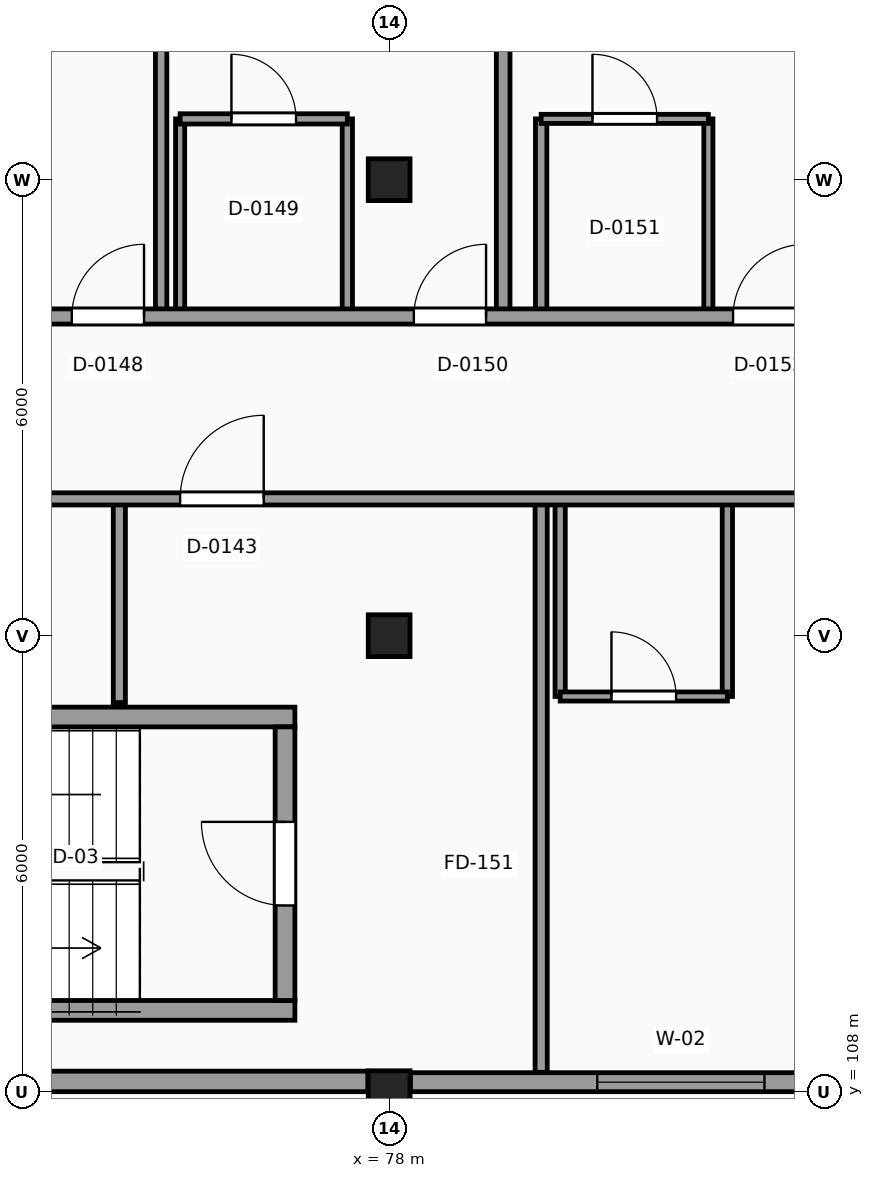
"""IFC4 building model, lengths in metres.
Left out: names, types, materials, properties, quantities, classifications, styles, units other than length and angle.
Written with IfcOpenShell. Run it as: python <this file> out.ifc"""

import sys

from ifc_helpers import new_model, si_unit, direction, frame, frame_2d, origin, origin_2d, place, context, subcontext, project, spatial, rectangle, extrude, element, fill, save


model = new_model("IFC4")
c1 = context("Model", 3, precision=1e-05, world=origin(), true_north=direction((0.0, 1.0)))
c2 = subcontext(c1, "Body", "Model", "MODEL_VIEW")
j1 = project(units=[si_unit("LENGTHUNIT", "METRE"), si_unit("PLANEANGLEUNIT", "RADIAN")], contexts=[c1])
p1 = place(None, origin())
s1 = spatial("IfcSite", under=j1, at=p1, CompositionType="ELEMENT")
p2 = place(p1, origin())
s2 = spatial("IfcBuilding", under=s1, at=p2, CompositionType="ELEMENT")
p3 = place(p2, frame((0.0, 0.0, 24.6)))
s3 = spatial("IfcBuildingStorey", under=s2, at=p3, CompositionType="ELEMENT", Elevation=24.6)
for number, where, z_axis, x_axis in (
    (1, (78.0, 108.0, 0.0), (0.0, 0.0, 1.0), (1.0, 0.0, 0.0)),
    (2, (78.0, 114.0, 0.0), (0.0, 0.0, 1.0), (1.0, 0.0, 0.0)),
    (3, (78.0, 120.0, 0.0), (0.0, 0.0, 1.0), (1.0, 0.0, 0.0)),
):
    element("IfcColumn", number, at=place(p3, frame(where, z_axis=z_axis, x_axis=x_axis)), inside=s3, PredefinedType="COLUMN", context=c2, shape_type="SweptSolid", body=[
        extrude(rectangle(XDim=0.55, YDim=0.55, at=origin_2d()), origin(), (0.0, 0.0, 1.0), 3.6),
    ])
p4 = place(p3, frame((72.305, 108.135, 0.0), z_axis=(0.0, 0.0, 1.0), x_axis=(1.0, 0.0, 0.0)))
e4 = element("IfcWall", 4, at=p4, inside=s3, PredefinedType="SOLIDWALL", context=c2, shape_type="SweptSolid", body=[
    extrude(rectangle(XDim=5.415, YDim=0.27, at=frame_2d((2.708, 0.0))), origin(), (0.0, 0.0, 1.0), 2.73),
])
p5 = place(p3, frame((78.28, 108.125, 0.0), z_axis=(0.0, 0.0, 1.0), x_axis=(1.0, 0.0, 0.0)))
e5 = element("IfcWall", 5, at=p5, inside=s3, PredefinedType="SOLIDWALL", context=c2, shape_type="SweptSolid", body=[
    extrude(rectangle(XDim=5.415, YDim=0.25, at=frame_2d((2.708, 0.0))), origin(), (0.0, 0.0, 1.0), 2.73),
])
p6 = place(p5, frame((2.458, 0.0, 0.8)))
e6 = element("IfcOpeningElement", 6, at=p6, cuts=e5, PredefinedType="OPENING", context=c2, shape_type="SweptSolid", body=[
    extrude(rectangle(XDim=2.2, YDim=1.75, at=frame_2d((1.1, 0.875))), frame((0.0, 0.135, 0.0), z_axis=(0.0, -1.0, 0.0), x_axis=(1.0, 0.0, 0.0)), (0.0, 0.0, 1.0), 0.27),
])
for number, where, z_axis, x_axis in (
    (7, (66.04, 109.07, 0.0), (0.0, 0.0, 1.0), (1.0, 0.0, 0.0)),
    (8, (66.04, 112.93, 0.0), (0.0, 0.0, 1.0), (1.0, 0.0, 0.0)),
):
    element("IfcWall", number, at=place(p3, frame(where, z_axis=z_axis, x_axis=x_axis)), inside=s3, PredefinedType="SHEAR", context=c2, shape_type="SweptSolid", body=[
        extrude(rectangle(XDim=10.72, YDim=0.26, at=frame_2d((5.36, 0.0))), origin(), (0.0, 0.0, 1.0), 3.6),
    ])
p7 = place(p3, frame((76.63, 109.2, 0.0), z_axis=(0.0, 0.0, 1.0), x_axis=(0.0, 1.0, 0.0)))
e9 = element("IfcWall", 9, at=p7, inside=s3, PredefinedType="SHEAR", context=c2, shape_type="SweptSolid", body=[
    extrude(rectangle(XDim=3.6, YDim=0.26, at=frame_2d((1.8, 0.0))), origin(), (0.0, 0.0, 1.0), 3.6),
])
p8 = place(p7, frame((1.25, 0.0, 0.0)))
e10 = element("IfcOpeningElement", 10, at=p8, cuts=e9, PredefinedType="OPENING", context=c2, shape_type="SweptSolid", body=[
    extrude(rectangle(XDim=1.1, YDim=2.15, at=frame_2d((0.55, 1.075))), frame((0.0, 0.14, 0.0), z_axis=(0.0, -1.0, 0.0), x_axis=(1.0, 0.0, 0.0)), (0.0, 0.0, 1.0), 0.28),
])
p9 = place(p3, frame((74.45, 113.12, 0.0), z_axis=(0.0, 0.0, 1.0), x_axis=(0.0, 1.0, 0.0)))
e11 = element("IfcWall", 11, at=p9, inside=s3, PredefinedType="PARTITIONING", context=c2, shape_type="SweptSolid", body=[
    extrude(rectangle(XDim=2.68, YDim=0.16, at=frame_2d((1.34, 0.0))), origin(), (0.0, 0.0, 1.0), 3.38),
])
p10 = place(p3, frame((75.0, 118.2, 0.0), z_axis=(0.0, 0.0, 1.0), x_axis=(0.0, 1.0, 0.0)))
e12 = element("IfcWall", 12, at=p10, inside=s3, PredefinedType="PARTITIONING", context=c2, shape_type="SweptSolid", body=[
    extrude(rectangle(XDim=7.565, YDim=0.15, at=frame_2d((3.782, 0.0))), origin(), (0.0, 0.0, 1.0), 3.38),
])
p11 = place(p3, frame((75.25, 118.2, 0.0), z_axis=(0.0, 0.0, 1.0), x_axis=(0.0, 1.0, 0.0)))
e13 = element("IfcWall", 13, at=p11, inside=s3, PredefinedType="PARTITIONING", context=c2, shape_type="SweptSolid", body=[
    extrude(rectangle(XDim=2.6, YDim=0.12, at=frame_2d((1.3, 0.0))), origin(), (0.0, 0.0, 1.0), 3.38),
])
p12 = place(p3, frame((77.45, 118.2, 0.0), z_axis=(0.0, 0.0, 1.0), x_axis=(0.0, 1.0, 0.0)))
e14 = element("IfcWall", 14, at=p12, inside=s3, PredefinedType="PARTITIONING", context=c2, shape_type="SweptSolid", body=[
    extrude(rectangle(XDim=2.6, YDim=0.135, at=frame_2d((1.3, 0.0))), origin(), (0.0, 0.0, 1.0), 3.38),
])
p13 = place(p3, frame((79.5, 118.2, 0.0), z_axis=(0.0, 0.0, 1.0), x_axis=(0.0, 1.0, 0.0)))
e15 = element("IfcWall", 15, at=p13, inside=s3, PredefinedType="PARTITIONING", context=c2, shape_type="SweptSolid", body=[
    extrude(rectangle(XDim=7.545, YDim=0.18, at=frame_2d((3.772, 0.0))), origin(), (0.0, 0.0, 1.0), 3.38),
])
p14 = place(p3, frame((80.0, 108.255, 0.0), z_axis=(0.0, 0.0, 1.0), x_axis=(0.0, 1.0, 0.0)))
e16 = element("IfcWall", 16, at=p14, inside=s3, PredefinedType="PARTITIONING", context=c2, shape_type="SweptSolid", body=[
    extrude(rectangle(XDim=7.545, YDim=0.16, at=frame_2d((3.772, 0.0))), origin(), (0.0, 0.0, 1.0), 3.38),
])
p15 = place(p3, frame((80.0, 118.2, 0.0), z_axis=(0.0, 0.0, 1.0), x_axis=(0.0, 1.0, 0.0)))
e17 = element("IfcWall", 17, at=p15, inside=s3, PredefinedType="PARTITIONING", context=c2, shape_type="SweptSolid", body=[
    extrude(rectangle(XDim=2.6, YDim=0.15, at=frame_2d((1.3, 0.0))), origin(), (0.0, 0.0, 1.0), 3.38),
])
p16 = place(p3, frame((80.25, 113.2, 0.0), z_axis=(0.0, 0.0, 1.0), x_axis=(0.0, 1.0, 0.0)))
e18 = element("IfcWall", 18, at=p16, inside=s3, PredefinedType="PARTITIONING", context=c2, shape_type="SweptSolid", body=[
    extrude(rectangle(XDim=2.6, YDim=0.135, at=frame_2d((1.3, 0.0))), origin(), (0.0, 0.0, 1.0), 3.38),
])
p17 = place(p3, frame((82.2, 118.2, 0.0), z_axis=(0.0, 0.0, 1.0), x_axis=(0.0, 1.0, 0.0)))
e19 = element("IfcWall", 19, at=p17, inside=s3, PredefinedType="PARTITIONING", context=c2, shape_type="SweptSolid", body=[
    extrude(rectangle(XDim=2.6, YDim=0.12, at=frame_2d((1.3, 0.0))), origin(), (0.0, 0.0, 1.0), 3.38),
])
p18 = place(p3, frame((82.45, 113.2, 0.0), z_axis=(0.0, 0.0, 1.0), x_axis=(0.0, 1.0, 0.0)))
e20 = element("IfcWall", 20, at=p18, inside=s3, PredefinedType="PARTITIONING", context=c2, shape_type="SweptSolid", body=[
    extrude(rectangle(XDim=2.6, YDim=0.135, at=frame_2d((1.3, 0.0))), origin(), (0.0, 0.0, 1.0), 3.38),
])
p19 = place(p3, frame((80.25, 113.2, 0.0), z_axis=(0.0, 0.0, 1.0), x_axis=(1.0, 0.0, 0.0)))
e21 = element("IfcWall", 21, at=p19, inside=s3, PredefinedType="PARTITIONING", context=c2, shape_type="SweptSolid", body=[
    extrude(rectangle(XDim=2.2, YDim=0.12, at=frame_2d((1.1, 0.0))), origin(), (0.0, 0.0, 1.0), 3.38),
])
p20 = place(p19, frame((0.675, 0.0, 0.0)))
e22 = element("IfcOpeningElement", 22, at=p20, cuts=e21, PredefinedType="OPENING", context=c2, shape_type="SweptSolid", body=[
    extrude(rectangle(XDim=0.85, YDim=2.1, at=frame_2d((0.425, 1.05))), frame((0.0, 0.07, 0.0), z_axis=(0.0, -1.0, 0.0), x_axis=(1.0, 0.0, 0.0)), (0.0, 0.0, 1.0), 0.14),
])
p21 = place(p3, frame((66.255, 115.8, 0.0), z_axis=(0.0, 0.0, 1.0), x_axis=(1.0, 0.0, 0.0)))
e23 = element("IfcWall", 23, at=p21, inside=s3, PredefinedType="PARTITIONING", context=c2, shape_type="SweptSolid", body=[
    extrude(rectangle(XDim=103.545, YDim=0.16, at=frame_2d((51.772, 0.0))), origin(), (0.0, 0.0, 1.0), 3.38),
])
p22 = place(p21, frame((80.145, 0.0, 0.0)))
e24 = element("IfcOpeningElement", 24, at=p22, cuts=e23, PredefinedType="OPENING", context=c2, shape_type="SweptSolid", body=[
    extrude(rectangle(XDim=1.2, YDim=2.2, at=frame_2d((0.6, 1.1))), frame((0.0, 0.09, 0.0), z_axis=(0.0, -1.0, 0.0), x_axis=(1.0, 0.0, 0.0)), (0.0, 0.0, 1.0), 0.18),
])
p23 = place(p21, frame((50.145, 0.0, 0.0)))
e25 = element("IfcOpeningElement", 25, at=p23, cuts=e23, PredefinedType="OPENING", context=c2, shape_type="SweptSolid", body=[
    extrude(rectangle(XDim=1.2, YDim=2.2, at=frame_2d((0.6, 1.1))), frame((0.0, 0.09, 0.0), z_axis=(0.0, -1.0, 0.0), x_axis=(1.0, 0.0, 0.0)), (0.0, 0.0, 1.0), 0.18),
])
p24 = place(p21, frame((8.995, 0.0, 0.0)))
e26 = element("IfcOpeningElement", 26, at=p24, cuts=e23, PredefinedType="OPENING", context=c2, shape_type="SweptSolid", body=[
    extrude(rectangle(XDim=1.1, YDim=2.15, at=frame_2d((0.55, 1.075))), frame((0.0, 0.09, 0.0), z_axis=(0.0, -1.0, 0.0), x_axis=(1.0, 0.0, 0.0)), (0.0, 0.0, 1.0), 0.18),
])
p25 = place(p21, frame((55.295, 0.0, 0.0)))
e27 = element("IfcOpeningElement", 27, at=p25, cuts=e23, PredefinedType="OPENING", context=c2, shape_type="SweptSolid", body=[
    extrude(rectangle(XDim=1.0, YDim=2.15, at=frame_2d((0.5, 1.075))), frame((0.0, 0.09, 0.0), z_axis=(0.0, -1.0, 0.0), x_axis=(1.0, 0.0, 0.0)), (0.0, 0.0, 1.0), 0.18),
])
p26 = place(p21, frame((62.265, 0.0, 0.0)))
e28 = element("IfcOpeningElement", 28, at=p26, cuts=e23, PredefinedType="OPENING", context=c2, shape_type="SweptSolid", body=[
    extrude(rectangle(XDim=0.96, YDim=2.15, at=frame_2d((0.48, 1.075))), frame((0.0, 0.09, 0.0), z_axis=(0.0, -1.0, 0.0), x_axis=(1.0, 0.0, 0.0)), (0.0, 0.0, 1.0), 0.18),
])
p27 = place(p21, frame((31.945, 0.0, 0.0)))
e29 = element("IfcOpeningElement", 29, at=p27, cuts=e23, PredefinedType="OPENING", context=c2, shape_type="SweptSolid", body=[
    extrude(rectangle(XDim=1.6, YDim=2.25, at=frame_2d((0.8, 1.125))), frame((0.0, 0.09, 0.0), z_axis=(0.0, -1.0, 0.0), x_axis=(1.0, 0.0, 0.0)), (0.0, 0.0, 1.0), 0.18),
])
p28 = place(p21, frame((18.57, 0.0, 0.0)))
e30 = element("IfcOpeningElement", 30, at=p28, cuts=e23, PredefinedType="OPENING", context=c2, shape_type="SweptSolid", body=[
    extrude(rectangle(XDim=0.95, YDim=2.1, at=frame_2d((0.475, 1.05))), frame((0.0, 0.09, 0.0), z_axis=(0.0, -1.0, 0.0), x_axis=(1.0, 0.0, 0.0)), (0.0, 0.0, 1.0), 0.18),
])
p29 = place(p21, frame((24.57, 0.0, 0.0)))
e31 = element("IfcOpeningElement", 31, at=p29, cuts=e23, PredefinedType="OPENING", context=c2, shape_type="SweptSolid", body=[
    extrude(rectangle(XDim=0.95, YDim=2.1, at=frame_2d((0.475, 1.05))), frame((0.0, 0.09, 0.0), z_axis=(0.0, -1.0, 0.0), x_axis=(1.0, 0.0, 0.0)), (0.0, 0.0, 1.0), 0.18),
])
p30 = place(p21, frame((84.47, 0.0, 0.0)))
e32 = element("IfcOpeningElement", 32, at=p30, cuts=e23, PredefinedType="OPENING", context=c2, shape_type="SweptSolid", body=[
    extrude(rectangle(XDim=0.95, YDim=2.1, at=frame_2d((0.475, 1.05))), frame((0.0, 0.09, 0.0), z_axis=(0.0, -1.0, 0.0), x_axis=(1.0, 0.0, 0.0)), (0.0, 0.0, 1.0), 0.18),
])
p31 = place(p3, frame((66.255, 118.2, 0.0), z_axis=(0.0, 0.0, 1.0), x_axis=(1.0, 0.0, 0.0)))
e33 = element("IfcWall", 33, at=p31, inside=s3, PredefinedType="PARTITIONING", context=c2, shape_type="SweptSolid", body=[
    extrude(rectangle(XDim=110.245, YDim=0.2, at=frame_2d((55.123, 0.0))), origin(), (0.0, 0.0, 1.0), 3.38),
])
p32 = place(p31, frame((7.57, 0.0, 0.0)))
e34 = element("IfcOpeningElement", 34, at=p32, cuts=e33, PredefinedType="OPENING", context=c2, shape_type="SweptSolid", body=[
    extrude(rectangle(XDim=0.95, YDim=2.1, at=frame_2d((0.475, 1.05))), frame((0.0, 0.11, 0.0), z_axis=(0.0, -1.0, 0.0), x_axis=(1.0, 0.0, 0.0)), (0.0, 0.0, 1.0), 0.22),
])
p33 = place(p31, frame((12.07, 0.0, 0.0)))
e35 = element("IfcOpeningElement", 35, at=p33, cuts=e33, PredefinedType="OPENING", context=c2, shape_type="SweptSolid", body=[
    extrude(rectangle(XDim=0.95, YDim=2.1, at=frame_2d((0.475, 1.05))), frame((0.0, 0.11, 0.0), z_axis=(0.0, -1.0, 0.0), x_axis=(1.0, 0.0, 0.0)), (0.0, 0.0, 1.0), 0.22),
])
p34 = place(p31, frame((16.27, 0.0, 0.0)))
e36 = element("IfcOpeningElement", 36, at=p34, cuts=e33, PredefinedType="OPENING", context=c2, shape_type="SweptSolid", body=[
    extrude(rectangle(XDim=0.95, YDim=2.1, at=frame_2d((0.475, 1.05))), frame((0.0, 0.11, 0.0), z_axis=(0.0, -1.0, 0.0), x_axis=(1.0, 0.0, 0.0)), (0.0, 0.0, 1.0), 0.22),
])
p35 = place(p31, frame((18.47, 0.0, 0.0)))
e37 = element("IfcOpeningElement", 37, at=p35, cuts=e33, PredefinedType="OPENING", context=c2, shape_type="SweptSolid", body=[
    extrude(rectangle(XDim=0.95, YDim=2.1, at=frame_2d((0.475, 1.05))), frame((0.0, 0.11, 0.0), z_axis=(0.0, -1.0, 0.0), x_axis=(1.0, 0.0, 0.0)), (0.0, 0.0, 1.0), 0.22),
])
p36 = place(p31, frame((32.32, 0.0, 0.0)))
e38 = element("IfcOpeningElement", 38, at=p36, cuts=e33, PredefinedType="OPENING", context=c2, shape_type="SweptSolid", body=[
    extrude(rectangle(XDim=0.95, YDim=2.1, at=frame_2d((0.475, 1.05))), frame((0.0, 0.11, 0.0), z_axis=(0.0, -1.0, 0.0), x_axis=(1.0, 0.0, 0.0)), (0.0, 0.0, 1.0), 0.22),
])
p37 = place(p31, frame((36.47, 0.0, 0.0)))
e39 = element("IfcOpeningElement", 39, at=p37, cuts=e33, PredefinedType="OPENING", context=c2, shape_type="SweptSolid", body=[
    extrude(rectangle(XDim=0.95, YDim=2.1, at=frame_2d((0.475, 1.05))), frame((0.0, 0.11, 0.0), z_axis=(0.0, -1.0, 0.0), x_axis=(1.0, 0.0, 0.0)), (0.0, 0.0, 1.0), 0.22),
])
p38 = place(p31, frame((46.27, 0.0, 0.0)))
e40 = element("IfcOpeningElement", 40, at=p38, cuts=e33, PredefinedType="OPENING", context=c2, shape_type="SweptSolid", body=[
    extrude(rectangle(XDim=0.95, YDim=2.1, at=frame_2d((0.475, 1.05))), frame((0.0, 0.11, 0.0), z_axis=(0.0, -1.0, 0.0), x_axis=(1.0, 0.0, 0.0)), (0.0, 0.0, 1.0), 0.22),
])
p39 = place(p31, frame((48.47, 0.0, 0.0)))
e41 = element("IfcOpeningElement", 41, at=p39, cuts=e33, PredefinedType="OPENING", context=c2, shape_type="SweptSolid", body=[
    extrude(rectangle(XDim=0.95, YDim=2.1, at=frame_2d((0.475, 1.05))), frame((0.0, 0.11, 0.0), z_axis=(0.0, -1.0, 0.0), x_axis=(1.0, 0.0, 0.0)), (0.0, 0.0, 1.0), 0.22),
])
p40 = place(p31, frame((52.87, 0.0, 0.0)))
e42 = element("IfcOpeningElement", 42, at=p40, cuts=e33, PredefinedType="OPENING", context=c2, shape_type="SweptSolid", body=[
    extrude(rectangle(XDim=0.95, YDim=2.1, at=frame_2d((0.475, 1.05))), frame((0.0, 0.11, 0.0), z_axis=(0.0, -1.0, 0.0), x_axis=(1.0, 0.0, 0.0)), (0.0, 0.0, 1.0), 0.22),
])
p41 = place(p31, frame((60.07, 0.0, 0.0)))
e43 = element("IfcOpeningElement", 43, at=p41, cuts=e33, PredefinedType="OPENING", context=c2, shape_type="SweptSolid", body=[
    extrude(rectangle(XDim=0.95, YDim=2.1, at=frame_2d((0.475, 1.05))), frame((0.0, 0.11, 0.0), z_axis=(0.0, -1.0, 0.0), x_axis=(1.0, 0.0, 0.0)), (0.0, 0.0, 1.0), 0.22),
])
p42 = place(p31, frame((68.32, 0.0, 0.0)))
e44 = element("IfcOpeningElement", 44, at=p42, cuts=e33, PredefinedType="OPENING", context=c2, shape_type="SweptSolid", body=[
    extrude(rectangle(XDim=0.95, YDim=2.1, at=frame_2d((0.475, 1.05))), frame((0.0, 0.11, 0.0), z_axis=(0.0, -1.0, 0.0), x_axis=(1.0, 0.0, 0.0)), (0.0, 0.0, 1.0), 0.22),
])
p43 = place(p31, frame((80.32, 0.0, 0.0)))
e45 = element("IfcOpeningElement", 45, at=p43, cuts=e33, PredefinedType="OPENING", context=c2, shape_type="SweptSolid", body=[
    extrude(rectangle(XDim=0.95, YDim=2.1, at=frame_2d((0.475, 1.05))), frame((0.0, 0.11, 0.0), z_axis=(0.0, -1.0, 0.0), x_axis=(1.0, 0.0, 0.0)), (0.0, 0.0, 1.0), 0.22),
])
p44 = place(p31, frame((82.87, 0.0, 0.0)))
e46 = element("IfcOpeningElement", 46, at=p44, cuts=e33, PredefinedType="OPENING", context=c2, shape_type="SweptSolid", body=[
    extrude(rectangle(XDim=0.95, YDim=2.1, at=frame_2d((0.475, 1.05))), frame((0.0, 0.11, 0.0), z_axis=(0.0, -1.0, 0.0), x_axis=(1.0, 0.0, 0.0)), (0.0, 0.0, 1.0), 0.22),
])
p45 = place(p31, frame((90.07, 0.0, 0.0)))
e47 = element("IfcOpeningElement", 47, at=p45, cuts=e33, PredefinedType="OPENING", context=c2, shape_type="SweptSolid", body=[
    extrude(rectangle(XDim=0.95, YDim=2.1, at=frame_2d((0.475, 1.05))), frame((0.0, 0.11, 0.0), z_axis=(0.0, -1.0, 0.0), x_axis=(1.0, 0.0, 0.0)), (0.0, 0.0, 1.0), 0.22),
])
p46 = place(p31, frame((94.27, 0.0, 0.0)))
e48 = element("IfcOpeningElement", 48, at=p46, cuts=e33, PredefinedType="OPENING", context=c2, shape_type="SweptSolid", body=[
    extrude(rectangle(XDim=0.95, YDim=2.1, at=frame_2d((0.475, 1.05))), frame((0.0, 0.11, 0.0), z_axis=(0.0, -1.0, 0.0), x_axis=(1.0, 0.0, 0.0)), (0.0, 0.0, 1.0), 0.22),
])
p47 = place(p31, frame((103.57, 0.0, 0.0)))
e49 = element("IfcOpeningElement", 49, at=p47, cuts=e33, PredefinedType="OPENING", context=c2, shape_type="SweptSolid", body=[
    extrude(rectangle(XDim=0.95, YDim=2.1, at=frame_2d((0.475, 1.05))), frame((0.0, 0.11, 0.0), z_axis=(0.0, -1.0, 0.0), x_axis=(1.0, 0.0, 0.0)), (0.0, 0.0, 1.0), 0.22),
])
p48 = place(p31, frame((104.97, 0.0, 0.0)))
e50 = element("IfcOpeningElement", 50, at=p48, cuts=e33, PredefinedType="OPENING", context=c2, shape_type="SweptSolid", body=[
    extrude(rectangle(XDim=0.95, YDim=2.1, at=frame_2d((0.475, 1.05))), frame((0.0, 0.11, 0.0), z_axis=(0.0, -1.0, 0.0), x_axis=(1.0, 0.0, 0.0)), (0.0, 0.0, 1.0), 0.22),
])
p49 = place(p3, frame((75.25, 120.8, 0.0), z_axis=(0.0, 0.0, 1.0), x_axis=(1.0, 0.0, 0.0)))
e51 = element("IfcWall", 51, at=p49, inside=s3, PredefinedType="PARTITIONING", context=c2, shape_type="SweptSolid", body=[
    extrude(rectangle(XDim=2.2, YDim=0.135, at=frame_2d((1.1, 0.0))), origin(), (0.0, 0.0, 1.0), 3.38),
])
p50 = place(p49, frame((0.675, 0.0, 0.0)))
e52 = element("IfcOpeningElement", 52, at=p50, cuts=e51, PredefinedType="OPENING", context=c2, shape_type="SweptSolid", body=[
    extrude(rectangle(XDim=0.85, YDim=2.1, at=frame_2d((0.425, 1.05))), frame((0.0, 0.078, 0.0), z_axis=(0.0, -1.0, 0.0), x_axis=(1.0, 0.0, 0.0)), (0.0, 0.0, 1.0), 0.155),
])
p51 = place(p3, frame((80.0, 120.8, 0.0), z_axis=(0.0, 0.0, 1.0), x_axis=(1.0, 0.0, 0.0)))
e53 = element("IfcWall", 53, at=p51, inside=s3, PredefinedType="PARTITIONING", context=c2, shape_type="SweptSolid", body=[
    extrude(rectangle(XDim=2.2, YDim=0.12, at=frame_2d((1.1, 0.0))), origin(), (0.0, 0.0, 1.0), 3.38),
])
p52 = place(p51, frame((0.675, 0.0, 0.0)))
e54 = element("IfcOpeningElement", 54, at=p52, cuts=e53, PredefinedType="OPENING", context=c2, shape_type="SweptSolid", body=[
    extrude(rectangle(XDim=0.85, YDim=2.1, at=frame_2d((0.425, 1.05))), frame((0.0, 0.07, 0.0), z_axis=(0.0, -1.0, 0.0), x_axis=(1.0, 0.0, 0.0)), (0.0, 0.0, 1.0), 0.14),
])
p53 = place(p6, origin())
e55 = element("IfcWindow", 55, at=p53, inside=s3, PartitioningType="SINGLE_PANEL", PredefinedType="WINDOW", context=c2, shape_type="SweptSolid", body=[
    extrude(rectangle(XDim=2.2, YDim=1.75, at=frame_2d((1.1, 0.875))), frame((0.0, 0.03, 0.0), z_axis=(0.0, -1.0, 0.0), x_axis=(1.0, 0.0, 0.0)), (0.0, 0.0, 1.0), 0.06),
])
fill(e6, e55)
p54 = place(p8, origin())
e56 = element("IfcDoor", 56, at=p54, inside=s3, OperationType="SINGLE_SWING_RIGHT", PredefinedType="DOOR", context=c2, shape_type="SweptSolid", body=[
    extrude(rectangle(XDim=1.1, YDim=2.15, at=frame_2d((0.55, 1.075))), frame((0.0, 0.025, 0.0), z_axis=(0.0, -1.0, 0.0), x_axis=(1.0, 0.0, 0.0)), (0.0, 0.0, 1.0), 0.05),
])
fill(e10, e56)
p55 = place(p24, origin())
e57 = element("IfcDoor", 57, at=p55, inside=s3, OperationType="SINGLE_SWING_RIGHT", PredefinedType="DOOR", context=c2, shape_type="SweptSolid", body=[
    extrude(rectangle(XDim=1.1, YDim=2.15, at=frame_2d((0.55, 1.075))), frame((0.0, 0.025, 0.0), z_axis=(0.0, -1.0, 0.0), x_axis=(1.0, 0.0, 0.0)), (0.0, 0.0, 1.0), 0.05),
])
fill(e26, e57)
p56 = place(p32, origin())
e58 = element("IfcDoor", 58, at=p56, inside=s3, OperationType="SINGLE_SWING_RIGHT", PredefinedType="DOOR", context=c2, shape_type="SweptSolid", body=[
    extrude(rectangle(XDim=0.95, YDim=2.1, at=frame_2d((0.475, 1.05))), frame((0.0, 0.025, 0.0), z_axis=(0.0, -1.0, 0.0), x_axis=(1.0, 0.0, 0.0)), (0.0, 0.0, 1.0), 0.05),
])
fill(e34, e58)
p57 = place(p50, origin())
e59 = element("IfcDoor", 59, at=p57, inside=s3, OperationType="SINGLE_SWING_LEFT", PredefinedType="DOOR", context=c2, shape_type="SweptSolid", body=[
    extrude(rectangle(XDim=0.85, YDim=2.1, at=frame_2d((0.425, 1.05))), frame((0.0, 0.025, 0.0), z_axis=(0.0, -1.0, 0.0), x_axis=(1.0, 0.0, 0.0)), (0.0, 0.0, 1.0), 0.05),
])
fill(e52, e59)
p58 = place(p33, origin())
e60 = element("IfcDoor", 60, at=p58, inside=s3, OperationType="SINGLE_SWING_RIGHT", PredefinedType="DOOR", context=c2, shape_type="SweptSolid", body=[
    extrude(rectangle(XDim=0.95, YDim=2.1, at=frame_2d((0.475, 1.05))), frame((0.0, 0.025, 0.0), z_axis=(0.0, -1.0, 0.0), x_axis=(1.0, 0.0, 0.0)), (0.0, 0.0, 1.0), 0.05),
])
fill(e35, e60)
p59 = place(p52, origin())
e61 = element("IfcDoor", 61, at=p59, inside=s3, OperationType="SINGLE_SWING_LEFT", PredefinedType="DOOR", context=c2, shape_type="SweptSolid", body=[
    extrude(rectangle(XDim=0.85, YDim=2.1, at=frame_2d((0.425, 1.05))), frame((0.0, 0.025, 0.0), z_axis=(0.0, -1.0, 0.0), x_axis=(1.0, 0.0, 0.0)), (0.0, 0.0, 1.0), 0.05),
])
fill(e54, e61)
p60 = place(p34, origin())
e62 = element("IfcDoor", 62, at=p60, inside=s3, OperationType="SINGLE_SWING_RIGHT", PredefinedType="DOOR", context=c2, shape_type="SweptSolid", body=[
    extrude(rectangle(XDim=0.95, YDim=2.1, at=frame_2d((0.475, 1.05))), frame((0.0, 0.025, 0.0), z_axis=(0.0, -1.0, 0.0), x_axis=(1.0, 0.0, 0.0)), (0.0, 0.0, 1.0), 0.05),
])
fill(e36, e62)
p61 = place(p20, origin())
e63 = element("IfcDoor", 63, at=p61, inside=s3, OperationType="SINGLE_SWING_LEFT", PredefinedType="DOOR", context=c2, shape_type="SweptSolid", body=[
    extrude(rectangle(XDim=0.85, YDim=2.1, at=frame_2d((0.425, 1.05))), frame((0.0, 0.025, 0.0), z_axis=(0.0, -1.0, 0.0), x_axis=(1.0, 0.0, 0.0)), (0.0, 0.0, 1.0), 0.05),
])
fill(e22, e63)
save(model, sys.argv[1])
